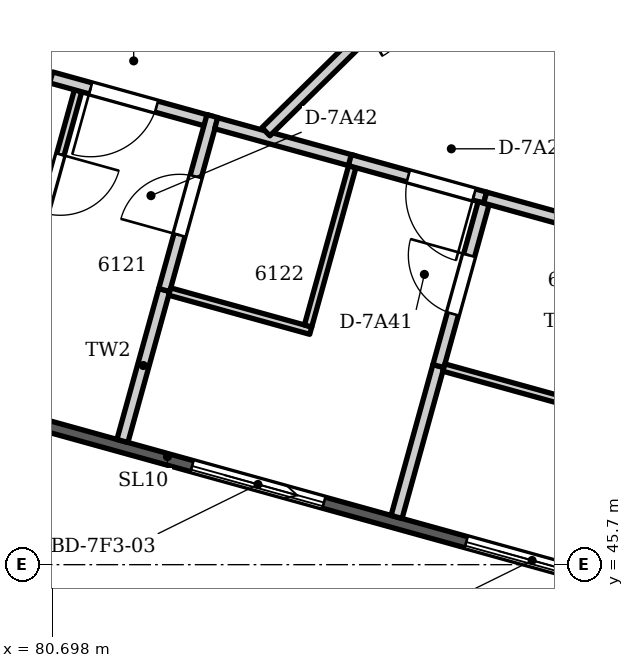
"""IFC4 building model, lengths in metres.
Left out: names, types, materials, properties, quantities, classifications, styles, units other than length and angle.
Written with IfcOpenShell. Run it as: python <this file> out.ifc"""

import sys

from ifc_helpers import new_model, si_unit, direction, frame, frame_2d, origin, place, context, subcontext, project, spatial, polyline, rectangle, outline, extrude, element, fill, save


model = new_model("IFC4")
c1 = context("Model", 3, precision=1e-05, world=origin(), true_north=direction((0.0, 1.0)))
c2 = subcontext(c1, "Body", "Model", "MODEL_VIEW")
j1 = project(units=[si_unit("LENGTHUNIT", "METRE"), si_unit("PLANEANGLEUNIT", "RADIAN")], contexts=[c1])
p1 = place(None, origin())
s1 = spatial("IfcSite", under=j1, at=p1, CompositionType="ELEMENT")
p2 = place(p1, origin())
s2 = spatial("IfcBuilding", under=s1, at=p2, CompositionType="ELEMENT")
p3 = place(p2, frame((0.0, 0.0, 234.9)))
s3 = spatial("IfcBuildingStorey", under=s2, at=p3, CompositionType="ELEMENT", Elevation=234.9)
p4 = place(p3, frame((92.419, 44.255, 0.0), z_axis=(0.0, 0.0, 1.0), x_axis=(-0.963630586427, 0.267237895708, 0.0)))
e1 = element("IfcWall", 1, at=p4, inside=s3, PredefinedType="SOLIDWALL", context=c2, shape_type="SweptSolid", body=[
    extrude(outline(polyline([(0.149, 0.075), (0.149, -0.075), (33.537, -0.075), (33.537, 0.075), (0.149, 0.075)])), origin(), (0.0, 0.0, 1.0), 3.3),
])
p5 = place(p4, frame((1.171, 0.0, 0.0)))
e2 = element("IfcOpeningElement", 2, at=p5, cuts=e1, PredefinedType="OPENING", context=c2, shape_type="SweptSolid", body=[
    extrude(rectangle(XDim=1.8, YDim=2.6, at=frame_2d((0.9, 1.3))), frame((0.0, 0.085, 0.0), z_axis=(0.0, -1.0, 0.0), x_axis=(1.0, 0.0, 0.0)), (0.0, 0.0, 1.0), 0.17),
])
p6 = place(p4, frame((4.714, 0.0, 0.0)))
e3 = element("IfcOpeningElement", 3, at=p6, cuts=e1, PredefinedType="OPENING", context=c2, shape_type="SweptSolid", body=[
    extrude(rectangle(XDim=1.8, YDim=2.6, at=frame_2d((0.9, 1.3))), frame((0.0, 0.085, 0.0), z_axis=(0.0, -1.0, 0.0), x_axis=(1.0, 0.0, 0.0)), (0.0, 0.0, 1.0), 0.17),
])
p7 = place(p4, frame((8.457, 0.0, 0.0)))
e4 = element("IfcOpeningElement", 4, at=p7, cuts=e1, PredefinedType="OPENING", context=c2, shape_type="SweptSolid", body=[
    extrude(rectangle(XDim=1.8, YDim=2.6, at=frame_2d((0.9, 1.3))), frame((0.0, 0.085, 0.0), z_axis=(0.0, -1.0, 0.0), x_axis=(1.0, 0.0, 0.0)), (0.0, 0.0, 1.0), 0.17),
])
p8 = place(p4, frame((12.2, 0.0, 0.0)))
e5 = element("IfcOpeningElement", 5, at=p8, cuts=e1, PredefinedType="OPENING", context=c2, shape_type="SweptSolid", body=[
    extrude(rectangle(XDim=1.8, YDim=2.6, at=frame_2d((0.9, 1.3))), frame((0.0, 0.085, 0.0), z_axis=(0.0, -1.0, 0.0), x_axis=(1.0, 0.0, 0.0)), (0.0, 0.0, 1.0), 0.17),
])
p9 = place(p4, frame((15.943, 0.0, 0.0)))
e6 = element("IfcOpeningElement", 6, at=p9, cuts=e1, PredefinedType="OPENING", context=c2, shape_type="SweptSolid", body=[
    extrude(rectangle(XDim=1.8, YDim=2.6, at=frame_2d((0.9, 1.3))), frame((0.0, 0.085, 0.0), z_axis=(0.0, -1.0, 0.0), x_axis=(1.0, 0.0, 0.0)), (0.0, 0.0, 1.0), 0.17),
])
p10 = place(p4, frame((19.686, 0.0, 0.0)))
e7 = element("IfcOpeningElement", 7, at=p10, cuts=e1, PredefinedType="OPENING", context=c2, shape_type="SweptSolid", body=[
    extrude(rectangle(XDim=1.8, YDim=2.6, at=frame_2d((0.9, 1.3))), frame((0.0, 0.085, 0.0), z_axis=(0.0, -1.0, 0.0), x_axis=(1.0, 0.0, 0.0)), (0.0, 0.0, 1.0), 0.17),
])
p11 = place(p4, frame((23.429, 0.0, 0.0)))
e8 = element("IfcOpeningElement", 8, at=p11, cuts=e1, PredefinedType="OPENING", context=c2, shape_type="SweptSolid", body=[
    extrude(rectangle(XDim=1.8, YDim=2.6, at=frame_2d((0.9, 1.3))), frame((0.0, 0.085, 0.0), z_axis=(0.0, -1.0, 0.0), x_axis=(1.0, 0.0, 0.0)), (0.0, 0.0, 1.0), 0.17),
])
p12 = place(p4, frame((27.172, 0.0, 0.0)))
e9 = element("IfcOpeningElement", 9, at=p12, cuts=e1, PredefinedType="OPENING", context=c2, shape_type="SweptSolid", body=[
    extrude(rectangle(XDim=1.8, YDim=2.6, at=frame_2d((0.9, 1.3))), frame((0.0, 0.085, 0.0), z_axis=(0.0, -1.0, 0.0), x_axis=(1.0, 0.0, 0.0)), (0.0, 0.0, 1.0), 0.17),
])
p13 = place(p4, frame((30.715, 0.0, 0.0)))
e10 = element("IfcOpeningElement", 10, at=p13, cuts=e1, PredefinedType="OPENING", context=c2, shape_type="SweptSolid", body=[
    extrude(rectangle(XDim=1.8, YDim=2.6, at=frame_2d((0.9, 1.3))), frame((0.0, 0.085, 0.0), z_axis=(0.0, -1.0, 0.0), x_axis=(1.0, 0.0, 0.0)), (0.0, 0.0, 1.0), 0.17),
])
p14 = place(p3, origin())
e11 = element("IfcWall", 11, at=p14, inside=s3, PredefinedType="PARAPET", context=c2, shape_type="SweptSolid", body=[
    extrude(outline(polyline([(59.388, 50.961), (96.326, 36.411), (96.275, 36.753), (62.154, 50.194), (59.388, 50.961)])), origin(), (0.0, 0.0, 1.0), 1.1),
])
p15 = place(p3, frame((80.356, 49.486, 0.0), z_axis=(0.0, 0.0, 1.0), x_axis=(0.267267405356, 0.963622402207, 0.0)))
e12 = element("IfcWall", 12, at=p15, inside=s3, PredefinedType="PARTITIONING", context=c2, shape_type="SweptSolid", body=[
    extrude(rectangle(XDim=2.542, YDim=0.1, at=frame_2d((1.271, 0.0))), origin(), (0.0, 0.0, 1.0), 3.3),
])
p16 = place(p15, frame((0.871, 0.0, 0.0)))
e13 = element("IfcOpeningElement", 13, at=p16, cuts=e12, PredefinedType="OPENING", context=c2, shape_type="SweptSolid", body=[
    extrude(rectangle(XDim=0.8, YDim=2.1, at=frame_2d((0.4, 1.05))), frame((0.0, 0.06, 0.0), z_axis=(0.0, -1.0, 0.0), x_axis=(1.0, 0.0, 0.0)), (0.0, 0.0, 1.0), 0.12),
])
p17 = place(p3, frame((80.682, 52.11, 0.0), z_axis=(0.0, 0.0, 1.0), x_axis=(0.96358351927, -0.267407556722, 0.0)))
e14 = element("IfcWall", 14, at=p17, inside=s3, PredefinedType="PARTITIONING", context=c2, shape_type="SweptSolid", body=[
    extrude(rectangle(XDim=2.185, YDim=0.15, at=frame_2d((1.092, 0.0))), origin(), (0.0, 0.0, 1.0), 3.3),
])
p18 = place(p17, frame((0.538, 0.0, 0.0)))
e15 = element("IfcOpeningElement", 15, at=p18, cuts=e14, PredefinedType="OPENING", context=c2, shape_type="SweptSolid", body=[
    extrude(rectangle(XDim=0.9, YDim=2.1, at=frame_2d((0.45, 1.05))), frame((0.0, 0.085, 0.0), z_axis=(0.0, -1.0, 0.0), x_axis=(1.0, 0.0, 0.0)), (0.0, 0.0, 1.0), 0.17),
])
p19 = place(p3, frame((81.619, 47.327, 0.0), z_axis=(0.0, 0.0, 1.0), x_axis=(0.267075474737, 0.963675614921, 0.0)))
e16 = element("IfcWall", 16, at=p19, inside=s3, PredefinedType="PARTITIONING", context=c2, shape_type="SweptSolid", body=[
    extrude(rectangle(XDim=2.061, YDim=0.15, at=frame_2d((1.03, 0.0))), origin(), (0.0, 0.0, 1.0), 3.3),
])
p20 = place(p3, frame((82.169, 49.313, 0.0), z_axis=(0.0, 0.0, 1.0), x_axis=(0.267490099625, 0.963560608681, 0.0)))
e17 = element("IfcWall", 17, at=p20, inside=s3, PredefinedType="PARTITIONING", context=c2, shape_type="SweptSolid", body=[
    extrude(rectangle(XDim=2.375, YDim=0.15, at=frame_2d((1.188, 0.0))), origin(), (0.0, 0.0, 1.0), 3.3),
])
p21 = place(p20, frame((0.75, 0.0, 0.0)))
e18 = element("IfcOpeningElement", 18, at=p21, cuts=e17, PredefinedType="OPENING", context=c2, shape_type="SweptSolid", body=[
    extrude(rectangle(XDim=0.8, YDim=2.1, at=frame_2d((0.4, 1.05))), frame((0.0, 0.085, 0.0), z_axis=(0.0, -1.0, 0.0), x_axis=(1.0, 0.0, 0.0)), (0.0, 0.0, 1.0), 0.17),
])
p22 = place(p3, frame((82.241, 49.293, 0.0), z_axis=(0.0, 0.0, 1.0), x_axis=(0.963634107358, -0.26722519929, 0.0)))
e19 = element("IfcWall", 19, at=p22, inside=s3, PredefinedType="PARTITIONING", context=c2, shape_type="SweptSolid", body=[
    extrude(rectangle(XDim=1.925, YDim=0.1, at=frame_2d((0.962, 0.0))), origin(), (0.0, 0.0, 1.0), 3.3),
])
p23 = place(p3, frame((82.852, 51.508, 0.0), z_axis=(0.0, 0.0, 1.0), x_axis=(0.963942160186, -0.266111840805, 0.0)))
e20 = element("IfcWall", 20, at=p23, inside=s3, PredefinedType="PARTITIONING", context=c2, shape_type="SweptSolid", body=[
    extrude(rectangle(XDim=1.883, YDim=0.15, at=frame_2d((0.941, 0.0))), origin(), (0.0, 0.0, 1.0), 3.3),
])
p24 = place(p3, frame((83.507, 51.396, 0.0), z_axis=(0.0, 0.0, 1.0), x_axis=(0.712824796749, 0.701342148412, 0.0)))
e21 = element("IfcWall", 21, at=p24, inside=s3, PredefinedType="PARTITIONING", context=c2, shape_type="SweptSolid", body=[
    extrude(rectangle(XDim=2.169, YDim=0.15, at=frame_2d((1.084, 0.0))), origin(), (0.0, 0.0, 1.0), 3.3),
])
p25 = place(p3, frame((84.061, 48.84, 0.0), z_axis=(0.0, 0.0, 1.0), x_axis=(0.26738911175, 0.96358863781, 0.0)))
e22 = element("IfcWall", 22, at=p25, inside=s3, PredefinedType="PARTITIONING", context=c2, shape_type="SweptSolid", body=[
    extrude(rectangle(XDim=2.175, YDim=0.1, at=frame_2d((1.087, 0.0))), origin(), (0.0, 0.0, 1.0), 3.3),
])
p26 = place(p3, frame((84.611, 51.022, 0.0), z_axis=(0.0, 0.0, 1.0), x_axis=(0.963673001046, -0.267084906077, 0.0)))
e23 = element("IfcWall", 23, at=p26, inside=s3, PredefinedType="PARTITIONING", context=c2, shape_type="SweptSolid", body=[
    extrude(rectangle(XDim=1.847, YDim=0.15, at=frame_2d((0.924, 0.0))), origin(), (0.0, 0.0, 1.0), 3.3),
])
p27 = place(p26, frame((0.797, 0.0, 0.0)))
e24 = element("IfcOpeningElement", 24, at=p27, cuts=e23, PredefinedType="OPENING", context=c2, shape_type="SweptSolid", body=[
    extrude(rectangle(XDim=0.9, YDim=2.1, at=frame_2d((0.45, 1.05))), frame((0.0, 0.085, 0.0), z_axis=(0.0, -1.0, 0.0), x_axis=(1.0, 0.0, 0.0)), (0.0, 0.0, 1.0), 0.17),
])
p28 = place(p3, frame((85.226, 46.327, 0.0), z_axis=(0.0, 0.0, 1.0), x_axis=(0.267075474737, 0.963675614921, 0.0)))
e25 = element("IfcWall", 25, at=p28, inside=s3, PredefinedType="PARTITIONING", context=c2, shape_type="SweptSolid", body=[
    extrude(rectangle(XDim=2.061, YDim=0.15, at=frame_2d((1.03, 0.0))), origin(), (0.0, 0.0, 1.0), 3.3),
])
p29 = place(p3, frame((85.776, 48.313, 0.0), z_axis=(0.0, 0.0, 1.0), x_axis=(0.267423129935, 0.963579197355, 0.0)))
e26 = element("IfcWall", 26, at=p29, inside=s3, PredefinedType="PARTITIONING", context=c2, shape_type="SweptSolid", body=[
    extrude(rectangle(XDim=2.225, YDim=0.15, at=frame_2d((1.112, 0.0))), origin(), (0.0, 0.0, 1.0), 3.3),
])
p30 = place(p29, frame((0.712, 0.0, 0.0)))
e27 = element("IfcOpeningElement", 27, at=p30, cuts=e26, PredefinedType="OPENING", context=c2, shape_type="SweptSolid", body=[
    extrude(rectangle(XDim=0.8, YDim=2.1, at=frame_2d((0.4, 1.05))), frame((0.0, 0.085, 0.0), z_axis=(0.0, -1.0, 0.0), x_axis=(1.0, 0.0, 0.0)), (0.0, 0.0, 1.0), 0.17),
])
p31 = place(p3, frame((85.848, 48.293, 0.0), z_axis=(0.0, 0.0, 1.0), x_axis=(0.963625049046, -0.267257862095, 0.0)))
e28 = element("IfcWall", 28, at=p31, inside=s3, PredefinedType="PARTITIONING", context=c2, shape_type="SweptSolid", body=[
    extrude(rectangle(XDim=1.925, YDim=0.1, at=frame_2d((0.962, 0.0))), origin(), (0.0, 0.0, 1.0), 3.3),
])
p32 = place(p3, frame((86.391, 50.529, 0.0), z_axis=(0.0, 0.0, 1.0), x_axis=(0.963631856359, -0.267233316428, 0.0)))
e29 = element("IfcWall", 29, at=p32, inside=s3, PredefinedType="PARTITIONING", context=c2, shape_type="SweptSolid", body=[
    extrude(rectangle(XDim=3.742, YDim=0.15, at=frame_2d((1.871, 0.0))), origin(), (0.0, 0.0, 1.0), 3.3),
])
p33 = place(p32, frame((2.692, 0.0, 0.0)))
e30 = element("IfcOpeningElement", 30, at=p33, cuts=e29, PredefinedType="OPENING", context=c2, shape_type="SweptSolid", body=[
    extrude(rectangle(XDim=0.9, YDim=2.1, at=frame_2d((0.45, 1.05))), frame((0.0, 0.085, 0.0), z_axis=(0.0, -1.0, 0.0), x_axis=(1.0, 0.0, 0.0)), (0.0, 0.0, 1.0), 0.17),
])
p34 = place(p6, origin())
e31 = element("IfcDoor", 31, at=p34, inside=s3, OperationType="SLIDING_TO_LEFT", PredefinedType="DOOR", context=c2, shape_type="SweptSolid", body=[
    extrude(rectangle(XDim=1.8, YDim=2.6, at=frame_2d((0.9, 1.3))), frame((0.0, 0.025, 0.0), z_axis=(0.0, -1.0, 0.0), x_axis=(1.0, 0.0, 0.0)), (0.0, 0.0, 1.0), 0.05),
])
fill(e3, e31)
p35 = place(p7, origin())
e32 = element("IfcDoor", 32, at=p35, inside=s3, OperationType="SLIDING_TO_LEFT", PredefinedType="DOOR", context=c2, shape_type="SweptSolid", body=[
    extrude(rectangle(XDim=1.8, YDim=2.6, at=frame_2d((0.9, 1.3))), frame((0.0, 0.025, 0.0), z_axis=(0.0, -1.0, 0.0), x_axis=(1.0, 0.0, 0.0)), (0.0, 0.0, 1.0), 0.05),
])
fill(e4, e32)
p36 = place(p27, frame((0.9, 0.0, 0.0), z_axis=(0.0, 0.0, 1.0), x_axis=(-1.0, 0.0, 0.0)))
e33 = element("IfcDoor", 33, at=p36, inside=s3, OperationType="SINGLE_SWING_LEFT", PredefinedType="DOOR", context=c2, shape_type="SweptSolid", body=[
    extrude(rectangle(XDim=0.9, YDim=2.1, at=frame_2d((0.45, 1.05))), frame((0.0, 0.025, 0.0), z_axis=(0.0, -1.0, 0.0), x_axis=(1.0, 0.0, 0.0)), (0.0, 0.0, 1.0), 0.05),
])
fill(e24, e33)
p37 = place(p18, frame((0.9, 0.0, 0.0), z_axis=(0.0, 0.0, 1.0), x_axis=(-1.0, 0.0, 0.0)))
e34 = element("IfcDoor", 34, at=p37, inside=s3, OperationType="SINGLE_SWING_RIGHT", PredefinedType="DOOR", context=c2, shape_type="SweptSolid", body=[
    extrude(rectangle(XDim=0.9, YDim=2.1, at=frame_2d((0.45, 1.05))), frame((0.0, 0.025, 0.0), z_axis=(0.0, -1.0, 0.0), x_axis=(1.0, 0.0, 0.0)), (0.0, 0.0, 1.0), 0.05),
])
fill(e15, e34)
p38 = place(p30, origin())
e35 = element("IfcDoor", 35, at=p38, inside=s3, OperationType="SINGLE_SWING_RIGHT", PredefinedType="DOOR", context=c2, shape_type="SweptSolid", body=[
    extrude(rectangle(XDim=0.8, YDim=2.1, at=frame_2d((0.4, 1.05))), frame((0.0, 0.025, 0.0), z_axis=(0.0, -1.0, 0.0), x_axis=(1.0, 0.0, 0.0)), (0.0, 0.0, 1.0), 0.05),
])
fill(e27, e35)
p39 = place(p21, origin())
e36 = element("IfcDoor", 36, at=p39, inside=s3, OperationType="SINGLE_SWING_LEFT", PredefinedType="DOOR", context=c2, shape_type="SweptSolid", body=[
    extrude(rectangle(XDim=0.8, YDim=2.1, at=frame_2d((0.4, 1.05))), frame((0.0, 0.025, 0.0), z_axis=(0.0, -1.0, 0.0), x_axis=(1.0, 0.0, 0.0)), (0.0, 0.0, 1.0), 0.05),
])
fill(e18, e36)
p40 = place(p16, frame((0.8, 0.0, 0.0), z_axis=(0.0, 0.0, 1.0), x_axis=(-1.0, 0.0, 0.0)))
e37 = element("IfcDoor", 37, at=p40, inside=s3, OperationType="SINGLE_SWING_LEFT", PredefinedType="DOOR", context=c2, shape_type="SweptSolid", body=[
    extrude(rectangle(XDim=0.8, YDim=2.1, at=frame_2d((0.4, 1.05))), frame((0.0, 0.025, 0.0), z_axis=(0.0, -1.0, 0.0), x_axis=(1.0, 0.0, 0.0)), (0.0, 0.0, 1.0), 0.05),
])
fill(e13, e37)
save(model, sys.argv[1])
